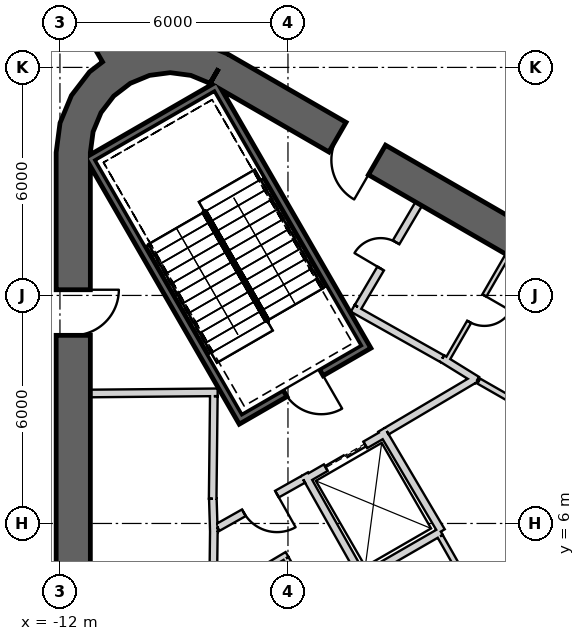
"""IFC4 building model, lengths in metres.
Left out: names, types, materials, properties, quantities, classifications, styles, units other than length and angle.
Written with IfcOpenShell. Run it as: python <this file> out.ifc"""

import sys

from ifc_helpers import new_model, si_unit, direction, frame, frame_2d, origin, place, context, subcontext, project, spatial, polyline, rectangle, outline, extrude, element, fill, save


model = new_model("IFC4")
c1 = context("Model", 3, precision=1e-05, world=origin(), true_north=direction((0.0, 1.0)))
c2 = subcontext(c1, "Body", "Model", "MODEL_VIEW")
j1 = project(units=[si_unit("LENGTHUNIT", "METRE"), si_unit("PLANEANGLEUNIT", "RADIAN")], contexts=[c1])
p1 = place(None, origin())
s1 = spatial("IfcSite", under=j1, at=p1, CompositionType="ELEMENT")
p2 = place(p1, origin())
s2 = spatial("IfcBuilding", under=s1, at=p2, CompositionType="ELEMENT")
p3 = place(p2, frame((0.0, 0.0, 283.7)))
s3 = spatial("IfcBuildingStorey", under=s2, at=p3, CompositionType="ELEMENT", Elevation=283.7)
p4 = place(p3, frame((19.475, 2.208, 0.0), z_axis=(0.0, 0.0, 1.0), x_axis=(-0.866028369851, 0.499994862586, 0.0)))
e1 = element("IfcWall", 1, at=p4, inside=s3, PredefinedType="SHEAR", context=c2, shape_type="SweptSolid", body=[
    extrude(rectangle(XDim=31.523, YDim=0.9, at=frame_2d((15.762, 0.0))), origin(), (0.0, 0.0, 1.0), 9.0),
])
p5 = place(p4, frame((3.612, 0.0, 0.0)))
e2 = element("IfcOpeningElement", 2, at=p5, cuts=e1, PredefinedType="OPENING", context=c2, shape_type="SweptSolid", body=[
    extrude(rectangle(XDim=1.2, YDim=2.4, at=frame_2d((0.6, 1.2))), frame((0.0, 0.46, 0.0), z_axis=(0.0, -1.0, 0.0), x_axis=(1.0, 0.0, 0.0)), (0.0, 0.0, 1.0), 0.92),
])
p6 = place(p4, frame((26.712, 0.0, 0.0)))
e3 = element("IfcOpeningElement", 3, at=p6, cuts=e1, PredefinedType="OPENING", context=c2, shape_type="SweptSolid", body=[
    extrude(rectangle(XDim=1.2, YDim=2.4, at=frame_2d((0.6, 1.2))), frame((0.0, 0.46, 0.0), z_axis=(0.0, -1.0, 0.0), x_axis=(1.0, 0.0, 0.0)), (0.0, 0.0, 1.0), 0.92),
])
p7 = place(p3, frame((-11.65, 15.762, 0.0), z_axis=(0.0, 0.0, 1.0), x_axis=(0.0, -1.0, 0.0)))
e4 = element("IfcWall", 4, at=p7, inside=s3, PredefinedType="SHEAR", context=c2, shape_type="SweptSolid", body=[
    extrude(rectangle(XDim=31.523, YDim=0.9, at=frame_2d((15.762, 0.0))), origin(), (0.0, 0.0, 1.0), 9.0),
])
p8 = place(p7, frame((3.612, 0.0, 0.0)))
e5 = element("IfcOpeningElement", 5, at=p8, cuts=e4, PredefinedType="OPENING", context=c2, shape_type="SweptSolid", body=[
    extrude(rectangle(XDim=1.2, YDim=2.4, at=frame_2d((0.6, 1.2))), frame((0.0, 0.46, 0.0), z_axis=(0.0, -1.0, 0.0), x_axis=(1.0, 0.0, 0.0)), (0.0, 0.0, 1.0), 0.92),
])
p9 = place(p7, frame((26.712, 0.0, 0.0)))
e6 = element("IfcOpeningElement", 6, at=p9, cuts=e4, PredefinedType="OPENING", context=c2, shape_type="SweptSolid", body=[
    extrude(rectangle(XDim=1.2, YDim=2.4, at=frame_2d((0.6, 1.2))), frame((0.0, 0.46, 0.0), z_axis=(0.0, -1.0, 0.0), x_axis=(1.0, 0.0, 0.0)), (0.0, 0.0, 1.0), 0.92),
])
p10 = place(p3, origin())
e7 = element("IfcWall", 7, at=p10, inside=s3, PredefinedType="SHEAR", context=c2, shape_type="SweptSolid", body=[
    extrude(outline(polyline([(-7.6, 18.36), (-8.323, 18.659), (-9.1, 18.762), (-9.876, 18.659), (-10.6, 18.36), (-11.221, 17.883), (-11.698, 17.262), (-11.998, 16.538), (-12.1, 15.762), (-11.2, 15.762), (-11.128, 16.305), (-10.919, 16.812), (-10.585, 17.247), (-10.15, 17.58), (-9.644, 17.79), (-9.1, 17.862), (-8.556, 17.79), (-8.05, 17.58), (-7.6, 18.36)])), origin(), (0.0, 0.0, 1.0), 9.0),
])
p11 = place(p3, frame((-10.575, 18.316, 0.0), z_axis=(0.0, 0.0, 1.0), x_axis=(-0.500007350791, 0.866021159762, 0.0)))
e8 = element("IfcWall", 8, at=p11, inside=s3, PredefinedType="SHEAR", context=c2, shape_type="SweptSolid", body=[
    extrude(rectangle(XDim=9.965, YDim=0.7, at=frame_2d((4.982, 0.0))), origin(), (0.0, 0.0, 1.0), 9.0),
])
p12 = place(p11, frame((2.05, 0.0, 0.0)))
e9 = element("IfcOpeningElement", 9, at=p12, cuts=e8, PredefinedType="OPENING", context=c2, shape_type="SweptSolid", body=[
    extrude(rectangle(XDim=1.4, YDim=2.4, at=frame_2d((0.7, 1.2))), frame((0.0, 0.36, 0.0), z_axis=(0.0, -1.0, 0.0), x_axis=(1.0, 0.0, 0.0)), (0.0, 0.0, 1.0), 0.72),
])
p13 = place(p3, frame((-11.2, 9.42, 0.0), z_axis=(0.0, 0.0, 1.0), x_axis=(0.999957167047, 0.009255488683, 0.0)))
e10 = element("IfcWall", 10, at=p13, inside=s3, PredefinedType="PLUMBINGWALL", context=c2, shape_type="SweptSolid", body=[
    extrude(rectangle(XDim=3.35, YDim=0.2, at=frame_2d((1.675, 0.0))), origin(), (0.0, 0.0, 1.0), 8.65),
])
p14 = place(p3, frame((-7.951, 9.35, 0.0), z_axis=(0.0, 0.0, 1.0), x_axis=(-0.011120469654, -0.999938165666, 0.0)))
e11 = element("IfcWall", 11, at=p14, inside=s3, PredefinedType="PLUMBINGWALL", context=c2, shape_type="SweptSolid", body=[
    extrude(rectangle(XDim=2.7, YDim=0.2, at=frame_2d((1.35, 0.0))), origin(), (0.0, 0.0, 1.0), 8.65),
])
p15 = place(p3, frame((-7.977, 6.65, 0.0), z_axis=(0.0, 0.0, 1.0), x_axis=(0.030861509705, -0.999523670164, 0.0)))
e12 = element("IfcWall", 12, at=p15, inside=s3, PredefinedType="PLUMBINGWALL", context=c2, shape_type="SweptSolid", body=[
    extrude(rectangle(XDim=0.878, YDim=0.2, at=frame_2d((0.439, 0.0))), origin(), (0.0, 0.0, 1.0), 8.65),
])
p16 = place(p3, frame((-7.949, 5.895, 0.0), z_axis=(0.0, 0.0, 1.0), x_axis=(-0.012042535896, -0.999927486035, 0.0)))
e13 = element("IfcWall", 13, at=p16, inside=s3, PredefinedType="PLUMBINGWALL", context=c2, shape_type="SweptSolid", body=[
    extrude(rectangle(XDim=1.845, YDim=0.2, at=frame_2d((0.922, 0.0))), origin(), (0.0, 0.0, 1.0), 8.65),
])
p17 = place(p3, frame((-11.245, 15.678, -0.4), z_axis=(0.0, 0.0, 1.0), x_axis=(0.499977274689, -0.866038523851, 0.0)))
e14 = element("IfcWall", 14, at=p17, inside=s3, PredefinedType="SHEAR", context=c2, shape_type="SweptSolid", body=[
    extrude(rectangle(XDim=8.1, YDim=0.2, at=frame_2d((4.05, 0.0))), origin(), (0.0, 0.0, 1.0), 9.05),
])
p18 = place(p3, frame((-7.818, 17.541, -0.4), z_axis=(0.0, 0.0, 1.0), x_axis=(-0.866044365799, -0.499967155389, 0.0)))
e15 = element("IfcWall", 15, at=p18, inside=s3, PredefinedType="SHEAR", context=c2, shape_type="SweptSolid", body=[
    extrude(rectangle(XDim=3.8, YDim=0.2, at=frame_2d((1.9, 0.0))), origin(), (0.0, 0.0, 1.0), 9.05),
])
p19 = place(p3, frame((-7.854, 17.405, -0.4), z_axis=(0.0, 0.0, 1.0), x_axis=(0.499997992926, -0.866026562566, 0.0)))
e16 = element("IfcWall", 16, at=p19, inside=s3, PredefinedType="SHEAR", context=c2, shape_type="SweptSolid", body=[
    extrude(rectangle(XDim=7.9, YDim=0.2, at=frame_2d((3.95, 0.0))), origin(), (0.0, 0.0, 1.0), 9.05),
])
p20 = place(p3, frame((-7.159, 8.8, -0.4), z_axis=(0.0, 0.0, 1.0), x_axis=(0.866047807691, 0.499961193289, 0.0)))
e17 = element("IfcWall", 17, at=p20, inside=s3, PredefinedType="SHEAR", context=c2, shape_type="SweptSolid", body=[
    extrude(rectangle(XDim=3.6, YDim=0.2, at=frame_2d((1.8, 0.0))), origin(), (0.0, 0.0, 1.0), 9.05),
])
p21 = place(p20, frame((1.25, 0.0, 0.4)))
e18 = element("IfcOpeningElement", 18, at=p21, cuts=e17, PredefinedType="OPENING", context=c2, shape_type="SweptSolid", body=[
    extrude(rectangle(XDim=1.1, YDim=2.1, at=frame_2d((0.55, 1.05))), frame((0.0, 0.11, 0.0), z_axis=(0.0, -1.0, 0.0), x_axis=(1.0, 0.0, 0.0)), (0.0, 0.0, 1.0), 0.22),
])
p22 = place(p3, frame((-5.524, 7.168, 0.0), z_axis=(0.0, 0.0, 1.0), x_axis=(0.866024647952, 0.500001309137, 0.0)))
e19 = element("IfcWall", 19, at=p22, inside=s3, PredefinedType="PLUMBINGWALL", context=c2, shape_type="SweptSolid", body=[
    extrude(rectangle(XDim=2.4, YDim=0.2, at=frame_2d((1.2, 0.0))), origin(), (0.0, 0.0, 1.0), 8.65),
])
p23 = place(p22, frame((0.6, 0.0, 0.0)))
e20 = element("IfcOpeningElement", 20, at=p23, cuts=e19, PredefinedType="OPENING", context=c2, shape_type="SweptSolid", body=[
    extrude(rectangle(XDim=1.2, YDim=2.4, at=frame_2d((0.6, 1.2))), frame((0.0, 0.11, 0.0), z_axis=(0.0, -1.0, 0.0), x_axis=(1.0, 0.0, 0.0)), (0.0, 0.0, 1.0), 0.22),
])
p24 = place(p3, frame((-3.538, 8.465, 0.0), z_axis=(0.0, 0.0, 1.0), x_axis=(0.508647062354, -0.860975125052, 0.0)))
e21 = element("IfcWall", 21, at=p24, inside=s3, PredefinedType="PLUMBINGWALL", context=c2, shape_type="SweptSolid", body=[
    extrude(rectangle(XDim=3.1, YDim=0.2, at=frame_2d((1.55, 0.0))), origin(), (0.0, 0.0, 1.0), 8.65),
])
p25 = place(p3, frame((-1.979, 5.786, 0.0), z_axis=(0.0, 0.0, 1.0), x_axis=(-0.866016689309, -0.500015093611, 0.0)))
e22 = element("IfcWall", 22, at=p25, inside=s3, PredefinedType="PLUMBINGWALL", context=c2, shape_type="SweptSolid", body=[
    extrude(rectangle(XDim=2.479, YDim=0.2, at=frame_2d((1.24, 0.0))), origin(), (0.0, 0.0, 1.0), 8.65),
])
p26 = place(p3, frame((-5.562, 7.296, 0.0), z_axis=(0.0, 0.0, 1.0), x_axis=(0.49134651263, -0.870964180966, 0.0)))
e23 = element("IfcWall", 23, at=p26, inside=s3, PredefinedType="PLUMBINGWALL", context=c2, shape_type="SweptSolid", body=[
    extrude(rectangle(XDim=3.0, YDim=0.2, at=frame_2d((1.5, 0.0))), origin(), (0.0, 0.0, 1.0), 8.65),
])
p27 = place(p3, frame((-0.22, 13.06, 0.0), z_axis=(0.0, 0.0, 1.0), x_axis=(-0.499984717929, -0.866034226713, 0.0)))
e24 = element("IfcWall", 24, at=p27, inside=s3, PredefinedType="PARTITIONING", context=c2, shape_type="SweptSolid", body=[
    extrude(rectangle(XDim=3.25, YDim=0.12, at=frame_2d((1.625, 0.0))), origin(), (0.0, 0.0, 1.0), 8.65),
])
p28 = place(p27, frame((1.225, 0.0, 0.0)))
e25 = element("IfcOpeningElement", 25, at=p28, cuts=e24, PredefinedType="OPENING", context=c2, shape_type="SweptSolid", body=[
    extrude(rectangle(XDim=0.8, YDim=2.1, at=frame_2d((0.4, 1.05))), frame((0.0, 0.07, 0.0), z_axis=(0.0, -1.0, 0.0), x_axis=(1.0, 0.0, 0.0)), (0.0, 0.0, 1.0), 0.14),
])
p29 = place(p3, frame((-1.941, 10.339, 0.0), z_axis=(0.0, 0.0, 1.0), x_axis=(0.850216889117, -0.526432561171, 0.0)))
e26 = element("IfcWall", 26, at=p29, inside=s3, PredefinedType="PARTITIONING", context=c2, shape_type="SweptSolid", body=[
    extrude(rectangle(XDim=1.078, YDim=0.2, at=frame_2d((0.539, 0.0))), origin(), (0.0, 0.0, 1.0), 8.65),
])
p30 = place(p3, frame((5.159, 6.236, 0.0), z_axis=(0.0, 0.0, 1.0), x_axis=(-0.868105023632, 0.496380567654, 0.0)))
e27 = element("IfcWall", 27, at=p30, inside=s3, PredefinedType="PLUMBINGWALL", context=c2, shape_type="SweptSolid", body=[
    extrude(rectangle(XDim=7.072, YDim=0.15, at=frame_2d((3.536, 0.0))), origin(), (0.0, 0.0, 1.0), 8.65),
])
p31 = place(p3, frame((-4.296, 11.659, 0.0), z_axis=(0.0, 0.0, 1.0), x_axis=(0.871534483978, -0.490334215854, 0.0)))
e28 = element("IfcWall", 28, at=p31, inside=s3, PredefinedType="PARTITIONING", context=c2, shape_type="SweptSolid", body=[
    extrude(rectangle(XDim=2.7, YDim=0.2, at=frame_2d((1.35, 0.0))), origin(), (0.0, 0.0, 1.0), 8.65),
])
p32 = place(p3, frame((-2.558, 14.409, 0.0), z_axis=(0.0, 0.0, 1.0), x_axis=(-0.508018930956, -0.861345903683, 0.0)))
e29 = element("IfcWall", 29, at=p32, inside=s3, PredefinedType="PARTITIONING", context=c2, shape_type="SweptSolid", body=[
    extrude(rectangle(XDim=3.15, YDim=0.2, at=frame_2d((1.575, 0.0))), origin(), (0.0, 0.0, 1.0), 8.65),
])
p33 = place(p32, frame((1.175, 0.0, 0.0)))
e30 = element("IfcOpeningElement", 30, at=p33, cuts=e29, PredefinedType="OPENING", context=c2, shape_type="SweptSolid", body=[
    extrude(rectangle(XDim=0.8, YDim=2.1, at=frame_2d((0.4, 1.05))), frame((0.0, 0.11, 0.0), z_axis=(0.0, -1.0, 0.0), x_axis=(1.0, 0.0, 0.0)), (0.0, 0.0, 1.0), 0.22),
])
p34 = place(p3, frame((-1.055, 9.818, 0.0), z_axis=(0.0, 0.0, 1.0), x_axis=(-0.860614334655, -0.50925726994, 0.0)))
e31 = element("IfcWall", 31, at=p34, inside=s3, PredefinedType="PARTITIONING", context=c2, shape_type="SweptSolid", body=[
    extrude(rectangle(XDim=2.726, YDim=0.2, at=frame_2d((1.363, 0.0))), origin(), (0.0, 0.0, 1.0), 8.65),
])
p35 = place(p3, frame((-5.6, 7.16, 0.0), z_axis=(0.0, 0.0, 1.0), x_axis=(-0.871363259478, -0.490638431059, 0.0)))
e32 = element("IfcWall", 32, at=p35, inside=s3, PredefinedType="PARTITIONING", context=c2, shape_type="SweptSolid", body=[
    extrude(rectangle(XDim=2.581, YDim=0.2, at=frame_2d((1.291, 0.0))), origin(), (0.0, 0.0, 1.0), 8.65),
])
p36 = place(p35, frame((0.791, 0.0, 0.0)))
e33 = element("IfcOpeningElement", 33, at=p36, cuts=e32, PredefinedType="OPENING", context=c2, shape_type="SweptSolid", body=[
    extrude(rectangle(XDim=1.0, YDim=2.1, at=frame_2d((0.5, 1.05))), frame((0.0, 0.11, 0.0), z_axis=(0.0, -1.0, 0.0), x_axis=(1.0, 0.0, 0.0)), (0.0, 0.0, 1.0), 0.22),
])
p37 = place(p3, frame((-1.994, 5.661, 0.0), z_axis=(0.0, 0.0, 1.0), x_axis=(0.494341211302, -0.869267948798, 0.0)))
e34 = element("IfcWall", 34, at=p37, inside=s3, PredefinedType="PLUMBINGWALL", context=c2, shape_type="SweptSolid", body=[
    extrude(rectangle(XDim=4.361, YDim=0.15, at=frame_2d((2.18, 0.0))), origin(), (0.0, 0.0, 1.0), 8.65),
])
p38 = place(p3, frame((-6.024, 5.183, 0.0), z_axis=(0.0, 0.0, 1.0), x_axis=(-0.860126804455, -0.510080268447, 0.0)))
e35 = element("IfcWall", 35, at=p38, inside=s3, PredefinedType="PLUMBINGWALL", context=c2, shape_type="SweptSolid", body=[
    extrude(rectangle(XDim=2.24, YDim=0.15, at=frame_2d((1.12, 0.0))), origin(), (0.0, 0.0, 1.0), 8.65),
])
p39 = place(p3, frame((-4.551, 2.482, 0.0), z_axis=(0.0, 0.0, 1.0), x_axis=(-0.499990139034, 0.866031096941, 0.0)))
e36 = element("IfcWall", 36, at=p39, inside=s3, PredefinedType="PLUMBINGWALL", context=c2, shape_type="SweptSolid", body=[
    extrude(rectangle(XDim=3.0, YDim=0.15, at=frame_2d((1.5, 0.0))), origin(), (0.0, 0.0, 1.0), 8.65),
])
p40 = place(p21, origin())
e37 = element("IfcDoor", 37, at=p40, inside=s3, OperationType="SINGLE_SWING_RIGHT", PredefinedType="USERDEFINED", context=c2, shape_type="SweptSolid", body=[
    extrude(rectangle(XDim=1.1, YDim=2.1, at=frame_2d((0.55, 1.05))), frame((0.0, 0.025, 0.0), z_axis=(0.0, -1.0, 0.0), x_axis=(1.0, 0.0, 0.0)), (0.0, 0.0, 1.0), 0.05),
])
fill(e18, e37)
p41 = place(p36, origin())
e38 = element("IfcDoor", 38, at=p41, inside=s3, OperationType="SINGLE_SWING_LEFT", PredefinedType="USERDEFINED", context=c2, shape_type="SweptSolid", body=[
    extrude(rectangle(XDim=1.0, YDim=2.1, at=frame_2d((0.5, 1.05))), frame((0.0, 0.025, 0.0), z_axis=(0.0, -1.0, 0.0), x_axis=(1.0, 0.0, 0.0)), (0.0, 0.0, 1.0), 0.05),
])
fill(e33, e38)
p42 = place(p23, origin())
e39 = element("IfcDoor", 39, at=p42, inside=s3, OperationType="SLIDING_TO_LEFT", PredefinedType="USERDEFINED", context=c2, shape_type="SweptSolid", body=[
    extrude(rectangle(XDim=1.2, YDim=2.4, at=frame_2d((0.6, 1.2))), frame((0.0, 0.025, 0.0), z_axis=(0.0, -1.0, 0.0), x_axis=(1.0, 0.0, 0.0)), (0.0, 0.0, 1.0), 0.05),
])
fill(e20, e39)
p43 = place(p28, origin())
e40 = element("IfcDoor", 40, at=p43, inside=s3, OperationType="SINGLE_SWING_LEFT", PredefinedType="USERDEFINED", context=c2, shape_type="SweptSolid", body=[
    extrude(rectangle(XDim=0.8, YDim=2.1, at=frame_2d((0.4, 1.05))), frame((0.0, 0.025, 0.0), z_axis=(0.0, -1.0, 0.0), x_axis=(1.0, 0.0, 0.0)), (0.0, 0.0, 1.0), 0.05),
])
fill(e25, e40)
p44 = place(p33, origin())
e41 = element("IfcDoor", 41, at=p44, inside=s3, OperationType="SINGLE_SWING_RIGHT", PredefinedType="USERDEFINED", context=c2, shape_type="SweptSolid", body=[
    extrude(rectangle(XDim=0.8, YDim=2.1, at=frame_2d((0.4, 1.05))), frame((0.0, 0.025, 0.0), z_axis=(0.0, -1.0, 0.0), x_axis=(1.0, 0.0, 0.0)), (0.0, 0.0, 1.0), 0.05),
])
fill(e30, e41)
p45 = place(p6, origin())
e42 = element("IfcDoor", 42, at=p45, inside=s3, OperationType="SINGLE_SWING_LEFT", PredefinedType="USERDEFINED", context=c2, shape_type="SweptSolid", body=[
    extrude(rectangle(XDim=1.2, YDim=2.4, at=frame_2d((0.6, 1.2))), frame((0.0, 0.025, 0.0), z_axis=(0.0, -1.0, 0.0), x_axis=(1.0, 0.0, 0.0)), (0.0, 0.0, 1.0), 0.05),
])
fill(e3, e42)
p46 = place(p8, origin())
e43 = element("IfcDoor", 43, at=p46, inside=s3, OperationType="SINGLE_SWING_LEFT", PredefinedType="USERDEFINED", context=c2, shape_type="SweptSolid", body=[
    extrude(rectangle(XDim=1.2, YDim=2.4, at=frame_2d((0.6, 1.2))), frame((0.0, 0.025, 0.0), z_axis=(0.0, -1.0, 0.0), x_axis=(1.0, 0.0, 0.0)), (0.0, 0.0, 1.0), 0.05),
])
fill(e5, e43)
save(model, sys.argv[1])
